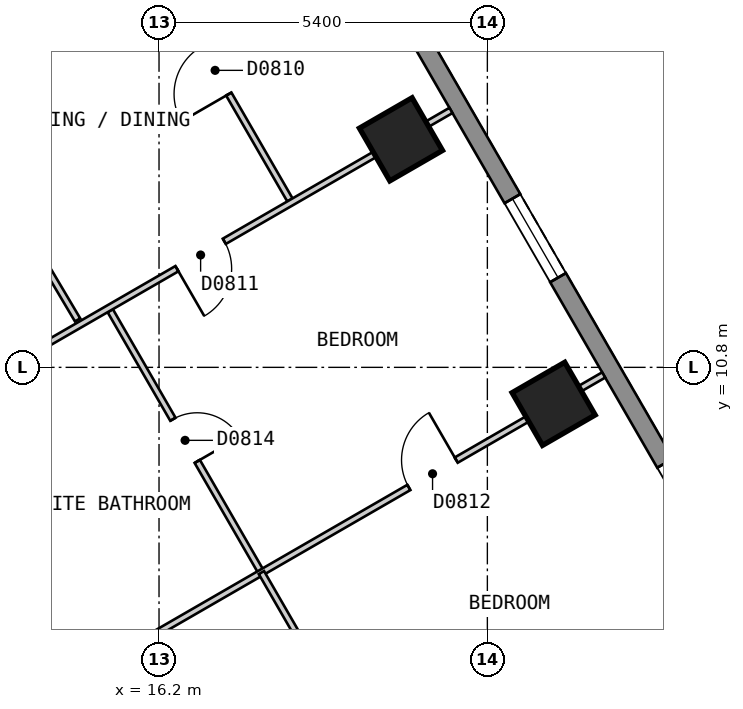
"""IFC4 building model, lengths in metres.
Left out: names, types, materials, properties, quantities, classifications, styles, units other than length and angle.
Written with IfcOpenShell. Run it as: python <this file> out.ifc"""

import sys

from ifc_helpers import new_model, si_unit, direction, frame, frame_2d, origin, origin_2d, place, context, subcontext, project, spatial, polyline, rectangle, outline, extrude, element, fill, save


model = new_model("IFC4")
c1 = context("Model", 3, precision=1e-05, world=origin(), true_north=direction((0.0, 1.0)))
c2 = subcontext(c1, "Body", "Model", "MODEL_VIEW")
j1 = project(units=[si_unit("LENGTHUNIT", "METRE"), si_unit("PLANEANGLEUNIT", "RADIAN")], contexts=[c1])
p1 = place(None, origin())
s1 = spatial("IfcSite", under=j1, at=p1, CompositionType="ELEMENT")
p2 = place(p1, origin())
s2 = spatial("IfcBuilding", under=s1, at=p2, CompositionType="ELEMENT")
p3 = place(p2, frame((0.0, 0.0, 72.0)))
s3 = spatial("IfcBuildingStorey", under=s2, at=p3, CompositionType="ELEMENT", Elevation=72.0)
for number, where, z_axis, x_axis in (
    (1, (22.69, 10.2, 0.0), (0.0, 0.0, 1.0), (-0.5, 0.866, 0.0)),
    (2, (20.179, 14.55, 0.0), (0.0, 0.0, 1.0), (-0.5, 0.866, 0.0)),
):
    element("IfcColumn", number, at=place(p3, frame(where, z_axis=z_axis, x_axis=x_axis)), inside=s3, PredefinedType="COLUMN", context=c2, shape_type="SweptSolid", body=[
        extrude(rectangle(XDim=1.0, YDim=1.0, at=origin_2d()), origin(), (0.0, 0.0, 1.0), 3.0),
    ])
p4 = place(p3, frame((29.027, 1.425, 0.0), z_axis=(0.0, 0.0, 1.0), x_axis=(-0.500027479704, 0.866009537788, 0.0)))
e3 = element("IfcWall", 3, at=p4, inside=s3, PredefinedType="SOLIDWALL", context=c2, shape_type="SweptSolid", body=[
    extrude(outline(polyline([(0.0, -0.15), (26.559, -0.15), (26.478, 0.15), (0.08, 0.15), (0.0, -0.15)])), origin(), (0.0, 0.0, 1.0), 2.7),
])
p5 = place(p4, frame((2.483, 0.0, 0.15)))
e4 = element("IfcOpeningElement", 4, at=p5, cuts=e3, PredefinedType="OPENING", context=c2, shape_type="SweptSolid", body=[
    extrude(rectangle(XDim=1.5, YDim=2.1, at=frame_2d((0.75, 1.05))), frame((0.0, 0.16, 0.0), z_axis=(0.0, -1.0, 0.0), x_axis=(1.0, 0.0, 0.0)), (0.0, 0.0, 1.0), 0.32),
])
p6 = place(p4, frame((7.506, 0.0, 0.15)))
e5 = element("IfcOpeningElement", 5, at=p6, cuts=e3, PredefinedType="OPENING", context=c2, shape_type="SweptSolid", body=[
    extrude(rectangle(XDim=1.5, YDim=2.1, at=frame_2d((0.75, 1.05))), frame((0.0, 0.16, 0.0), z_axis=(0.0, -1.0, 0.0), x_axis=(1.0, 0.0, 0.0)), (0.0, 0.0, 1.0), 0.32),
])
p7 = place(p4, frame((12.529, 0.0, 0.15)))
e6 = element("IfcOpeningElement", 6, at=p7, cuts=e3, PredefinedType="OPENING", context=c2, shape_type="SweptSolid", body=[
    extrude(rectangle(XDim=1.5, YDim=2.1, at=frame_2d((0.75, 1.05))), frame((0.0, 0.16, 0.0), z_axis=(0.0, -1.0, 0.0), x_axis=(1.0, 0.0, 0.0)), (0.0, 0.0, 1.0), 0.32),
])
p8 = place(p4, frame((17.552, 0.0, 0.15)))
e7 = element("IfcOpeningElement", 7, at=p8, cuts=e3, PredefinedType="OPENING", context=c2, shape_type="SweptSolid", body=[
    extrude(rectangle(XDim=1.5, YDim=2.1, at=frame_2d((0.75, 1.05))), frame((0.0, 0.16, 0.0), z_axis=(0.0, -1.0, 0.0), x_axis=(1.0, 0.0, 0.0)), (0.0, 0.0, 1.0), 0.32),
])
p9 = place(p4, frame((22.575, 0.0, 0.15)))
e8 = element("IfcOpeningElement", 8, at=p9, cuts=e3, PredefinedType="OPENING", context=c2, shape_type="SweptSolid", body=[
    extrude(rectangle(XDim=1.5, YDim=2.1, at=frame_2d((0.75, 1.05))), frame((0.0, 0.16, 0.0), z_axis=(0.0, -1.0, 0.0), x_axis=(1.0, 0.0, 0.0)), (0.0, 0.0, 1.0), 0.32),
])
p10 = place(p3, frame((10.913, 7.899, 0.0), z_axis=(0.0, 0.0, 1.0), x_axis=(0.500028940566, -0.866008694296, 0.0)))
e9 = element("IfcWall", 9, at=p10, inside=s3, PredefinedType="PARTITIONING", context=c2, shape_type="SweptSolid", body=[
    extrude(rectangle(XDim=10.159, YDim=0.2, at=frame_2d((5.08, 0.0))), origin(), (0.0, 0.0, 1.0), 2.7),
])
p11 = place(p10, frame((4.63, 0.0, 0.0)))
e10 = element("IfcOpeningElement", 10, at=p11, cuts=e9, PredefinedType="OPENING", context=c2, shape_type="SweptSolid", body=[
    extrude(rectangle(XDim=0.9, YDim=2.1, at=frame_2d((0.45, 1.05))), frame((0.0, 0.11, 0.0), z_axis=(0.0, -1.0, 0.0), x_axis=(1.0, 0.0, 0.0)), (0.0, 0.0, 1.0), 0.22),
])
p12 = place(p3, frame((8.488, 16.5, 0.0), z_axis=(0.0, 0.0, 1.0), x_axis=(0.499986836607, -0.86603300354, 0.0)))
e11 = element("IfcWall", 11, at=p12, inside=s3, PredefinedType="PARTITIONING", context=c2, shape_type="SweptSolid", body=[
    extrude(rectangle(XDim=20.09, YDim=0.2, at=frame_2d((10.045, 0.0))), origin(), (0.0, 0.0, 1.0), 2.7),
])
p13 = place(p12, frame((4.523, 0.0, 0.0)))
e12 = element("IfcOpeningElement", 12, at=p13, cuts=e11, PredefinedType="OPENING", context=c2, shape_type="SweptSolid", body=[
    extrude(rectangle(XDim=1.0, YDim=2.1, at=frame_2d((0.5, 1.05))), frame((0.0, 0.11, 0.0), z_axis=(0.0, -1.0, 0.0), x_axis=(1.0, 0.0, 0.0)), (0.0, 0.0, 1.0), 0.22),
])
p14 = place(p3, frame((13.247, 14.3, 0.0), z_axis=(0.0, 0.0, 1.0), x_axis=(0.510312234073, -0.85998919979, 0.0)))
e13 = element("IfcWall", 13, at=p14, inside=s3, PredefinedType="PARTITIONING", context=c2, shape_type="SweptSolid", body=[
    extrude(rectangle(XDim=3.163, YDim=0.1, at=frame_2d((1.582, 0.0))), origin(), (0.0, 0.0, 1.0), 2.7),
])
p15 = place(p3, frame((15.398, 11.731, 0.0), z_axis=(0.0, 0.0, 1.0), x_axis=(0.500010064822, -0.866019592779, 0.0)))
e14 = element("IfcWall", 14, at=p15, inside=s3, PredefinedType="PARTITIONING", context=c2, shape_type="SweptSolid", body=[
    extrude(rectangle(XDim=4.972, YDim=0.1, at=frame_2d((2.486, 0.0))), origin(), (0.0, 0.0, 1.0), 2.7),
])
p16 = place(p15, frame((2.061, 0.0, 0.0)))
e15 = element("IfcOpeningElement", 15, at=p16, cuts=e14, PredefinedType="OPENING", context=c2, shape_type="SweptSolid", body=[
    extrude(rectangle(XDim=0.8, YDim=2.1, at=frame_2d((0.4, 1.05))), frame((0.0, 0.06, 0.0), z_axis=(0.0, -1.0, 0.0), x_axis=(1.0, 0.0, 0.0)), (0.0, 0.0, 1.0), 0.12),
])
p17 = place(p3, frame((15.916, 17.773, 0.0), z_axis=(0.0, 0.0, 1.0), x_axis=(0.500093956194, -0.865971151354, 0.0)))
e16 = element("IfcWall", 16, at=p17, inside=s3, PredefinedType="PARTITIONING", context=c2, shape_type="SweptSolid", body=[
    extrude(rectangle(XDim=4.873, YDim=0.1, at=frame_2d((2.437, 0.0))), origin(), (0.0, 0.0, 1.0), 2.7),
])
p18 = place(p17, frame((1.962, 0.0, 0.0)))
e17 = element("IfcOpeningElement", 17, at=p18, cuts=e16, PredefinedType="OPENING", context=c2, shape_type="SweptSolid", body=[
    extrude(rectangle(XDim=0.9, YDim=2.1, at=frame_2d((0.45, 1.05))), frame((0.0, 0.06, 0.0), z_axis=(0.0, -1.0, 0.0), x_axis=(1.0, 0.0, 0.0)), (0.0, 0.0, 1.0), 0.12),
])
p19 = place(p3, frame((14.853, 5.675, 0.0), z_axis=(0.0, 0.0, 1.0), x_axis=(0.866016855193, 0.500014806302, 0.0)))
e18 = element("IfcWall", 18, at=p19, inside=s3, PredefinedType="PARTITIONING", context=c2, shape_type="SweptSolid", body=[
    extrude(rectangle(XDim=10.0, YDim=0.1, at=frame_2d((5.0, 0.0))), origin(), (0.0, 0.0, 1.0), 2.7),
])
p20 = place(p19, frame((6.3, 0.0, 0.0)))
e19 = element("IfcOpeningElement", 19, at=p20, cuts=e18, PredefinedType="OPENING", context=c2, shape_type="SweptSolid", body=[
    extrude(rectangle(XDim=0.9, YDim=2.1, at=frame_2d((0.45, 1.05))), frame((0.0, 0.06, 0.0), z_axis=(0.0, -1.0, 0.0), x_axis=(1.0, 0.0, 0.0)), (0.0, 0.0, 1.0), 0.12),
])
p21 = place(p3, frame((12.342, 10.025, 0.0), z_axis=(0.0, 0.0, 1.0), x_axis=(0.865992435864, 0.500057097767, 0.0)))
e20 = element("IfcWall", 20, at=p21, inside=s3, PredefinedType="PARTITIONING", context=c2, shape_type="SweptSolid", body=[
    extrude(rectangle(XDim=9.999, YDim=0.1, at=frame_2d((5.0, 0.0))), origin(), (0.0, 0.0, 1.0), 2.7),
])
p22 = place(p21, frame((4.795, 0.0, 0.0)))
e21 = element("IfcOpeningElement", 21, at=p22, cuts=e20, PredefinedType="OPENING", context=c2, shape_type="SweptSolid", body=[
    extrude(rectangle(XDim=0.9, YDim=2.1, at=frame_2d((0.45, 1.05))), frame((0.0, 0.06, 0.0), z_axis=(0.0, -1.0, 0.0), x_axis=(1.0, 0.0, 0.0)), (0.0, 0.0, 1.0), 0.12),
])
p23 = place(p3, frame((9.83, 14.375, 0.0), z_axis=(0.0, 0.0, 1.0), x_axis=(0.865992435864, 0.500057097767, 0.0)))
e22 = element("IfcWall", 22, at=p23, inside=s3, PredefinedType="PARTITIONING", context=c2, shape_type="SweptSolid", body=[
    extrude(rectangle(XDim=9.999, YDim=0.2, at=frame_2d((5.0, 0.0))), origin(), (0.0, 0.0, 1.0), 2.7),
])
p24 = place(p3, frame((17.884, 7.425, 0.0), z_axis=(0.0, 0.0, 1.0), x_axis=(0.500000007376, -0.866025399526, 0.0)))
e23 = element("IfcWall", 23, at=p24, inside=s3, PredefinedType="PARTITIONING", context=c2, shape_type="SweptSolid", body=[
    extrude(rectangle(XDim=4.924, YDim=0.1, at=frame_2d((2.462, 0.0))), origin(), (0.0, 0.0, 1.0), 2.7),
])
p25 = place(p24, frame((2.112, 0.0, 0.0)))
e24 = element("IfcOpeningElement", 24, at=p25, cuts=e23, PredefinedType="OPENING", context=c2, shape_type="SweptSolid", body=[
    extrude(rectangle(XDim=0.8, YDim=2.1, at=frame_2d((0.4, 1.05))), frame((0.0, 0.06, 0.0), z_axis=(0.0, -1.0, 0.0), x_axis=(1.0, 0.0, 0.0)), (0.0, 0.0, 1.0), 0.12),
])
p26 = place(p7, origin())
e25 = element("IfcWindow", 25, at=p26, inside=s3, PartitioningType="SINGLE_PANEL", PredefinedType="WINDOW", context=c2, shape_type="SweptSolid", body=[
    extrude(rectangle(XDim=1.5, YDim=2.1, at=frame_2d((0.75, 1.05))), frame((0.0, 0.03, 0.0), z_axis=(0.0, -1.0, 0.0), x_axis=(1.0, 0.0, 0.0)), (0.0, 0.0, 1.0), 0.06),
])
fill(e6, e25)
p27 = place(p18, origin())
e26 = element("IfcDoor", 26, at=p27, inside=s3, OperationType="SINGLE_SWING_RIGHT", PredefinedType="DOOR", context=c2, shape_type="SweptSolid", body=[
    extrude(rectangle(XDim=0.9, YDim=2.1, at=frame_2d((0.45, 1.05))), frame((0.0, 0.025, 0.0), z_axis=(0.0, -1.0, 0.0), x_axis=(1.0, 0.0, 0.0)), (0.0, 0.0, 1.0), 0.05),
])
fill(e17, e26)
p28 = place(p22, origin())
e27 = element("IfcDoor", 27, at=p28, inside=s3, OperationType="SINGLE_SWING_LEFT", PredefinedType="DOOR", context=c2, shape_type="SweptSolid", body=[
    extrude(rectangle(XDim=0.9, YDim=2.1, at=frame_2d((0.45, 1.05))), frame((0.0, 0.025, 0.0), z_axis=(0.0, -1.0, 0.0), x_axis=(1.0, 0.0, 0.0)), (0.0, 0.0, 1.0), 0.05),
])
fill(e21, e27)
p29 = place(p20, origin())
e28 = element("IfcDoor", 28, at=p29, inside=s3, OperationType="SINGLE_SWING_RIGHT", PredefinedType="DOOR", context=c2, shape_type="SweptSolid", body=[
    extrude(rectangle(XDim=0.9, YDim=2.1, at=frame_2d((0.45, 1.05))), frame((0.0, 0.025, 0.0), z_axis=(0.0, -1.0, 0.0), x_axis=(1.0, 0.0, 0.0)), (0.0, 0.0, 1.0), 0.05),
])
fill(e19, e28)
p30 = place(p16, origin())
e29 = element("IfcDoor", 29, at=p30, inside=s3, OperationType="SINGLE_SWING_RIGHT", PredefinedType="DOOR", context=c2, shape_type="SweptSolid", body=[
    extrude(rectangle(XDim=0.8, YDim=2.1, at=frame_2d((0.4, 1.05))), frame((0.0, 0.025, 0.0), z_axis=(0.0, -1.0, 0.0), x_axis=(1.0, 0.0, 0.0)), (0.0, 0.0, 1.0), 0.05),
])
fill(e15, e29)
save(model, sys.argv[1])
